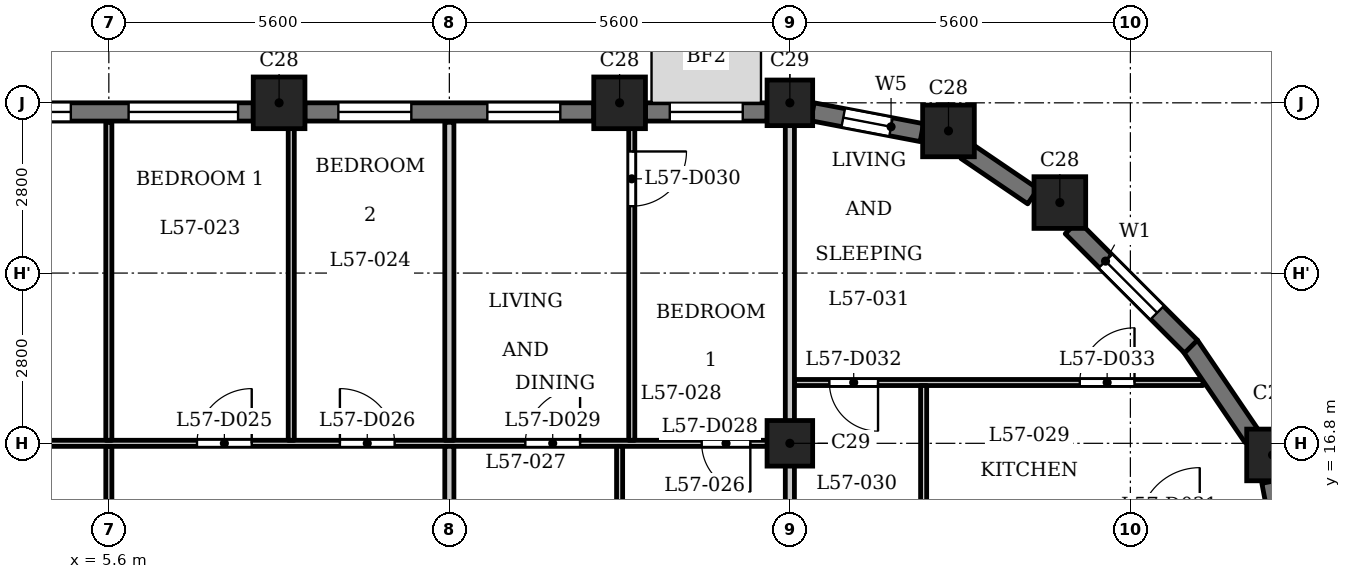
"""IFC4 building model, lengths in metres.
Left out: names, types, materials, properties, quantities, classifications, styles, units other than length and angle.
Written with IfcOpenShell. Run it as: python <this file> out.ifc"""

import sys

from ifc_helpers import new_model, si_unit, direction, frame, frame_2d, origin, origin_2d, place, context, subcontext, project, spatial, rectangle, extrude, element, fill, save


model = new_model("IFC4")
c1 = context("Model", 3, precision=1e-05, world=origin(), true_north=direction((0.0, 1.0)))
c2 = subcontext(c1, "Body", "Model", "MODEL_VIEW")
j1 = project(units=[si_unit("LENGTHUNIT", "METRE"), si_unit("PLANEANGLEUNIT", "RADIAN")], contexts=[c1])
p1 = place(None, origin())
s1 = spatial("IfcSite", under=j1, at=p1, CompositionType="ELEMENT")
p2 = place(p1, origin())
s2 = spatial("IfcBuilding", under=s1, at=p2, CompositionType="ELEMENT")
p3 = place(p2, frame((0.0, 0.0, 220.4)))
s3 = spatial("IfcBuildingStorey", under=s2, at=p3, CompositionType="ELEMENT", Elevation=220.4)
for number, where, z_axis, x_axis in (
    (1, (24.738, 16.609, 0.0), (0.0, 0.0, 1.0), (1.0, 0.0, 0.0)),
    (2, (21.24, 20.76, 0.0), (0.0, 0.0, 1.0), (1.0, 0.0, 0.0)),
    (3, (19.409, 21.938, 0.0), (0.0, 0.0, 1.0), (1.0, 0.0, 0.0)),
    (4, (14.0, 22.4, 0.0), (0.0, 0.0, 1.0), (1.0, 0.0, 0.0)),
    (5, (8.4, 22.4, 0.0), (0.0, 0.0, 1.0), (1.0, 0.0, 0.0)),
):
    element("IfcColumn", number, at=place(p3, frame(where, z_axis=z_axis, x_axis=x_axis)), inside=s3, PredefinedType="COLUMN", context=c2, shape_type="SweptSolid", body=[
        extrude(rectangle(XDim=0.85, YDim=0.85, at=origin_2d()), origin(), (0.0, 0.0, 1.0), 3.5),
    ])
for number, where, z_axis, x_axis in (
    (6, (16.8, 16.8, 0.0), (0.0, 0.0, 1.0), (1.0, 0.0, 0.0)),
    (7, (16.8, 22.4, 0.0), (0.0, 0.0, 1.0), (1.0, 0.0, 0.0)),
):
    element("IfcColumn", number, at=place(p3, frame(where, z_axis=z_axis, x_axis=x_axis)), inside=s3, PredefinedType="COLUMN", context=c2, shape_type="SweptSolid", body=[
        extrude(rectangle(XDim=0.75, YDim=0.75, at=origin_2d()), origin(), (0.0, 0.0, 1.0), 3.5),
    ])
for number, where, z_axis, x_axis in (
    (8, (25.053, 14.372, 0.0), (0.0, 0.0, 1.0), (-0.187, 0.982, 0.0)),
    (9, (24.408, 16.898, 0.0), (0.0, 0.0, 1.0), (-0.562, 0.827, 0.0)),
):
    element("IfcWall", number, at=place(p3, frame(where, z_axis=z_axis, x_axis=x_axis)), inside=s3, PredefinedType="SOLIDWALL", context=c2, shape_type="SweptSolid", body=[
        extrude(rectangle(XDim=1.831, YDim=0.3, at=frame_2d((0.916, 0.0))), origin(), (0.0, 0.0, 1.0), 2.5),
    ])
p4 = place(p3, frame((23.397, 18.391, 0.0), z_axis=(0.0, 0.0, 1.0), x_axis=(-0.707106781187, 0.707106781187, 0.0)))
e10 = element("IfcWall", 10, at=p4, inside=s3, PredefinedType="SOLIDWALL", context=c2, shape_type="SweptSolid", body=[
    extrude(rectangle(XDim=2.775, YDim=0.3, at=frame_2d((1.388, 0.0))), origin(), (0.0, 0.0, 1.0), 2.5),
])
p5 = place(p4, frame((0.788, 0.0, 0.6)))
e11 = element("IfcOpeningElement", 11, at=p5, cuts=e10, PredefinedType="OPENING", context=c2, shape_type="SweptSolid", body=[
    extrude(rectangle(XDim=1.2, YDim=1.55, at=frame_2d((0.6, 0.775))), frame((0.0, 0.16, 0.0), z_axis=(0.0, -1.0, 0.0), x_axis=(1.0, 0.0, 0.0)), (0.0, 0.0, 1.0), 0.32),
])
p6 = place(p3, frame((20.796, 20.862, 0.0), z_axis=(0.0, 0.0, 1.0), x_axis=(-0.827035970432, 0.562149004813, 0.0)))
e12 = element("IfcWall", 12, at=p6, inside=s3, PredefinedType="SOLIDWALL", context=c2, shape_type="SweptSolid", body=[
    extrude(rectangle(XDim=1.327, YDim=0.3, at=frame_2d((0.664, 0.0))), origin(), (0.0, 0.0, 1.0), 2.5),
])
p7 = place(p3, frame((18.971, 21.91, 0.0), z_axis=(0.0, 0.0, 1.0), x_axis=(-0.982300037503, 0.187314271538, 0.0)))
e13 = element("IfcWall", 13, at=p7, inside=s3, PredefinedType="SOLIDWALL", context=c2, shape_type="SweptSolid", body=[
    extrude(rectangle(XDim=1.831, YDim=0.3, at=frame_2d((0.916, 0.0))), origin(), (0.0, 0.0, 1.0), 2.5),
])
p8 = place(p7, frame((0.516, 0.0, 0.6)))
e14 = element("IfcOpeningElement", 14, at=p8, cuts=e13, PredefinedType="OPENING", context=c2, shape_type="SweptSolid", body=[
    extrude(rectangle(XDim=0.8, YDim=1.55, at=frame_2d((0.4, 0.775))), frame((0.0, 0.16, 0.0), z_axis=(0.0, -1.0, 0.0), x_axis=(1.0, 0.0, 0.0)), (0.0, 0.0, 1.0), 0.32),
])
p9 = place(p3, frame((16.425, 22.25, 0.0), z_axis=(0.0, 0.0, 1.0), x_axis=(-1.0, 0.0, 0.0)))
e15 = element("IfcWall", 15, at=p9, inside=s3, PredefinedType="SOLIDWALL", context=c2, shape_type="SweptSolid", body=[
    extrude(rectangle(XDim=2.0, YDim=0.3, at=frame_2d((1.0, 0.0))), origin(), (0.0, 0.0, 1.0), 2.5),
])
p10 = place(p9, frame((0.4, 0.0, 0.6)))
e16 = element("IfcOpeningElement", 16, at=p10, cuts=e15, PredefinedType="OPENING", context=c2, shape_type="SweptSolid", body=[
    extrude(rectangle(XDim=1.2, YDim=1.55, at=frame_2d((0.6, 0.775))), frame((0.0, 0.16, 0.0), z_axis=(0.0, -1.0, 0.0), x_axis=(1.0, 0.0, 0.0)), (0.0, 0.0, 1.0), 0.32),
])
p11 = place(p3, frame((13.575, 22.25, 0.0), z_axis=(0.0, 0.0, 1.0), x_axis=(-1.0, 0.0, 0.0)))
e17 = element("IfcWall", 17, at=p11, inside=s3, PredefinedType="SOLIDWALL", context=c2, shape_type="SweptSolid", body=[
    extrude(rectangle(XDim=4.75, YDim=0.3, at=frame_2d((2.375, 0.0))), origin(), (0.0, 0.0, 1.0), 2.5),
])
p12 = place(p11, frame((0.55, 0.0, 0.6)))
e18 = element("IfcOpeningElement", 18, at=p12, cuts=e17, PredefinedType="OPENING", context=c2, shape_type="SweptSolid", body=[
    extrude(rectangle(XDim=1.2, YDim=1.55, at=frame_2d((0.6, 0.775))), frame((0.0, 0.16, 0.0), z_axis=(0.0, -1.0, 0.0), x_axis=(1.0, 0.0, 0.0)), (0.0, 0.0, 1.0), 0.32),
])
p13 = place(p11, frame((3.0, 0.0, 0.6)))
e19 = element("IfcOpeningElement", 19, at=p13, cuts=e17, PredefinedType="OPENING", context=c2, shape_type="SweptSolid", body=[
    extrude(rectangle(XDim=1.2, YDim=1.55, at=frame_2d((0.6, 0.775))), frame((0.0, 0.16, 0.0), z_axis=(0.0, -1.0, 0.0), x_axis=(1.0, 0.0, 0.0)), (0.0, 0.0, 1.0), 0.32),
])
p14 = place(p3, frame((7.975, 22.25, 0.0), z_axis=(0.0, 0.0, 1.0), x_axis=(-1.0, 0.0, 0.0)))
e20 = element("IfcWall", 20, at=p14, inside=s3, PredefinedType="SOLIDWALL", context=c2, shape_type="SweptSolid", body=[
    extrude(rectangle(XDim=4.75, YDim=0.3, at=frame_2d((2.375, 0.0))), origin(), (0.0, 0.0, 1.0), 2.5),
])
p15 = place(p14, frame((0.25, 0.0, 0.9)))
e21 = element("IfcOpeningElement", 21, at=p15, cuts=e20, PredefinedType="OPENING", context=c2, shape_type="SweptSolid", body=[
    extrude(rectangle(XDim=1.8, YDim=1.25, at=frame_2d((0.9, 0.625))), frame((0.0, 0.16, 0.0), z_axis=(0.0, -1.0, 0.0), x_axis=(1.0, 0.0, 0.0)), (0.0, 0.0, 1.0), 0.32),
])
p16 = place(p14, frame((3.0, 0.0, 0.6)))
e22 = element("IfcOpeningElement", 22, at=p16, cuts=e20, PredefinedType="OPENING", context=c2, shape_type="SweptSolid", body=[
    extrude(rectangle(XDim=1.2, YDim=1.55, at=frame_2d((0.6, 0.775))), frame((0.0, 0.16, 0.0), z_axis=(0.0, -1.0, 0.0), x_axis=(1.0, 0.0, 0.0)), (0.0, 0.0, 1.0), 0.32),
])
p17 = place(p3, frame((-16.725, 16.8, 0.0), z_axis=(0.0, 0.0, 1.0), x_axis=(1.0, 0.0, 0.0)))
e23 = element("IfcWall", 23, at=p17, inside=s3, PredefinedType="PARTITIONING", context=c2, shape_type="SweptSolid", body=[
    extrude(rectangle(XDim=33.45, YDim=0.1, at=frame_2d((16.725, 0.0))), origin(), (0.0, 0.0, 1.0), 3.2),
])
p18 = place(p17, frame((11.675, 0.0, 0.0)))
e24 = element("IfcOpeningElement", 24, at=p18, cuts=e23, PredefinedType="OPENING", context=c2, shape_type="SweptSolid", body=[
    extrude(rectangle(XDim=0.9, YDim=2.1, at=frame_2d((0.45, 1.05))), frame((0.0, 0.06, 0.0), z_axis=(0.0, -1.0, 0.0), x_axis=(1.0, 0.0, 0.0)), (0.0, 0.0, 1.0), 0.12),
])
p19 = place(p17, frame((9.575, 0.0, 0.0)))
e25 = element("IfcOpeningElement", 25, at=p19, cuts=e23, PredefinedType="OPENING", context=c2, shape_type="SweptSolid", body=[
    extrude(rectangle(XDim=0.9, YDim=2.1, at=frame_2d((0.45, 1.05))), frame((0.0, 0.06, 0.0), z_axis=(0.0, -1.0, 0.0), x_axis=(1.0, 0.0, 0.0)), (0.0, 0.0, 1.0), 0.12),
])
p20 = place(p17, frame((17.375, 0.0, 0.0)))
e26 = element("IfcOpeningElement", 26, at=p20, cuts=e23, PredefinedType="OPENING", context=c2, shape_type="SweptSolid", body=[
    extrude(rectangle(XDim=0.8, YDim=2.1, at=frame_2d((0.4, 1.05))), frame((0.0, 0.06, 0.0), z_axis=(0.0, -1.0, 0.0), x_axis=(1.0, 0.0, 0.0)), (0.0, 0.0, 1.0), 0.12),
])
p21 = place(p17, frame((19.525, 0.0, 0.0)))
e27 = element("IfcOpeningElement", 27, at=p21, cuts=e23, PredefinedType="OPENING", context=c2, shape_type="SweptSolid", body=[
    extrude(rectangle(XDim=0.9, YDim=2.1, at=frame_2d((0.45, 1.05))), frame((0.0, 0.06, 0.0), z_axis=(0.0, -1.0, 0.0), x_axis=(1.0, 0.0, 0.0)), (0.0, 0.0, 1.0), 0.12),
])
p22 = place(p17, frame((23.775, 0.0, 0.0)))
e28 = element("IfcOpeningElement", 28, at=p22, cuts=e23, PredefinedType="OPENING", context=c2, shape_type="SweptSolid", body=[
    extrude(rectangle(XDim=0.9, YDim=2.1, at=frame_2d((0.45, 1.05))), frame((0.0, 0.06, 0.0), z_axis=(0.0, -1.0, 0.0), x_axis=(1.0, 0.0, 0.0)), (0.0, 0.0, 1.0), 0.12),
])
p23 = place(p17, frame((26.125, 0.0, 0.0)))
e29 = element("IfcOpeningElement", 29, at=p23, cuts=e23, PredefinedType="OPENING", context=c2, shape_type="SweptSolid", body=[
    extrude(rectangle(XDim=0.9, YDim=2.1, at=frame_2d((0.45, 1.05))), frame((0.0, 0.06, 0.0), z_axis=(0.0, -1.0, 0.0), x_axis=(1.0, 0.0, 0.0)), (0.0, 0.0, 1.0), 0.12),
])
p24 = place(p17, frame((32.075, 0.0, 0.0)))
e30 = element("IfcOpeningElement", 30, at=p24, cuts=e23, PredefinedType="OPENING", context=c2, shape_type="SweptSolid", body=[
    extrude(rectangle(XDim=0.8, YDim=2.1, at=frame_2d((0.4, 1.05))), frame((0.0, 0.06, 0.0), z_axis=(0.0, -1.0, 0.0), x_axis=(1.0, 0.0, 0.0)), (0.0, 0.0, 1.0), 0.12),
])
p25 = place(p17, frame((29.175, 0.0, 0.0)))
e31 = element("IfcOpeningElement", 31, at=p25, cuts=e23, PredefinedType="OPENING", context=c2, shape_type="SweptSolid", body=[
    extrude(rectangle(XDim=0.9, YDim=2.1, at=frame_2d((0.45, 1.05))), frame((0.0, 0.06, 0.0), z_axis=(0.0, -1.0, 0.0), x_axis=(1.0, 0.0, 0.0)), (0.0, 0.0, 1.0), 0.12),
])
p26 = place(p3, frame((16.875, 17.8, 0.0), z_axis=(0.0, 0.0, 1.0), x_axis=(1.0, 0.0, 0.0)))
e32 = element("IfcWall", 32, at=p26, inside=s3, PredefinedType="PARTITIONING", context=c2, shape_type="SweptSolid", body=[
    extrude(rectangle(XDim=6.719, YDim=0.1, at=frame_2d((3.359, 0.0))), origin(), (0.0, 0.0, 1.0), 3.2),
])
p27 = place(p26, frame((0.575, 0.0, 0.0)))
e33 = element("IfcOpeningElement", 33, at=p27, cuts=e32, PredefinedType="OPENING", context=c2, shape_type="SweptSolid", body=[
    extrude(rectangle(XDim=0.8, YDim=2.1, at=frame_2d((0.4, 1.05))), frame((0.0, 0.06, 0.0), z_axis=(0.0, -1.0, 0.0), x_axis=(1.0, 0.0, 0.0)), (0.0, 0.0, 1.0), 0.12),
])
p28 = place(p26, frame((4.693, 0.0, 0.0)))
e34 = element("IfcOpeningElement", 34, at=p28, cuts=e32, PredefinedType="OPENING", context=c2, shape_type="SweptSolid", body=[
    extrude(rectangle(XDim=0.9, YDim=2.1, at=frame_2d((0.45, 1.05))), frame((0.0, 0.06, 0.0), z_axis=(0.0, -1.0, 0.0), x_axis=(1.0, 0.0, 0.0)), (0.0, 0.0, 1.0), 0.12),
])
p29 = place(p3, frame((5.6, 13.275, 0.0), z_axis=(0.0, 0.0, 1.0), x_axis=(0.0, 1.0, 0.0)))
e35 = element("IfcWall", 35, at=p29, inside=s3, PredefinedType="PARTITIONING", context=c2, shape_type="SweptSolid", body=[
    extrude(rectangle(XDim=3.475, YDim=0.1, at=frame_2d((1.738, 0.0))), origin(), (0.0, 0.0, 1.0), 3.2),
])
p30 = place(p29, frame((0.475, 0.0, 0.0)))
e36 = element("IfcOpeningElement", 36, at=p30, cuts=e35, PredefinedType="OPENING", context=c2, shape_type="SweptSolid", body=[
    extrude(rectangle(XDim=0.9, YDim=2.1, at=frame_2d((0.45, 1.05))), frame((0.0, 0.06, 0.0), z_axis=(0.0, -1.0, 0.0), x_axis=(1.0, 0.0, 0.0)), (0.0, 0.0, 1.0), 0.12),
])
p31 = place(p3, frame((5.6, 16.85, 0.0), z_axis=(0.0, 0.0, 1.0), x_axis=(0.0, 1.0, 0.0)))
e37 = element("IfcWall", 37, at=p31, inside=s3, PredefinedType="PARTITIONING", context=c2, shape_type="SweptSolid", body=[
    extrude(rectangle(XDim=5.23, YDim=0.1, at=frame_2d((2.615, 0.0))), origin(), (0.0, 0.0, 1.0), 3.2),
])
p32 = place(p3, frame((8.6, 16.85, 0.0), z_axis=(0.0, 0.0, 1.0), x_axis=(0.0, 1.0, 0.0)))
e38 = element("IfcWall", 38, at=p32, inside=s3, PredefinedType="PARTITIONING", context=c2, shape_type="SweptSolid", body=[
    extrude(rectangle(XDim=5.955, YDim=0.1, at=frame_2d((2.978, 0.0))), origin(), (0.0, 0.0, 1.0), 3.2),
])
p33 = place(p3, frame((11.2, 13.275, 0.0), z_axis=(0.0, 0.0, 1.0), x_axis=(0.0, 1.0, 0.0)))
e39 = element("IfcWall", 39, at=p33, inside=s3, PredefinedType="PARTITIONING", context=c2, shape_type="SweptSolid", body=[
    extrude(rectangle(XDim=3.475, YDim=0.15, at=frame_2d((1.738, 0.0))), origin(), (0.0, 0.0, 1.0), 3.2),
])
p34 = place(p3, frame((11.2, 16.85, 0.0), z_axis=(0.0, 0.0, 1.0), x_axis=(0.0, 1.0, 0.0)))
e40 = element("IfcWall", 40, at=p34, inside=s3, PredefinedType="PARTITIONING", context=c2, shape_type="SweptSolid", body=[
    extrude(rectangle(XDim=5.23, YDim=0.15, at=frame_2d((2.615, 0.0))), origin(), (0.0, 0.0, 1.0), 3.2),
])
p35 = place(p3, frame((14.0, 13.275, 0.0), z_axis=(0.0, 0.0, 1.0), x_axis=(0.0, 1.0, 0.0)))
e41 = element("IfcWall", 41, at=p35, inside=s3, PredefinedType="PARTITIONING", context=c2, shape_type="SweptSolid", body=[
    extrude(rectangle(XDim=3.475, YDim=0.1, at=frame_2d((1.738, 0.0))), origin(), (0.0, 0.0, 1.0), 3.2),
])
p36 = place(p3, frame((14.2, 16.85, 0.0), z_axis=(0.0, 0.0, 1.0), x_axis=(0.0, 1.0, 0.0)))
e42 = element("IfcWall", 42, at=p36, inside=s3, PredefinedType="PARTITIONING", context=c2, shape_type="SweptSolid", body=[
    extrude(rectangle(XDim=5.46, YDim=0.1, at=frame_2d((2.73, 0.0))), origin(), (0.0, 0.0, 1.0), 3.2),
])
p37 = place(p36, frame((3.85, 0.0, 0.0)))
e43 = element("IfcOpeningElement", 43, at=p37, cuts=e42, PredefinedType="OPENING", context=c2, shape_type="SweptSolid", body=[
    extrude(rectangle(XDim=0.9, YDim=2.1, at=frame_2d((0.45, 1.05))), frame((0.0, 0.06, 0.0), z_axis=(0.0, -1.0, 0.0), x_axis=(1.0, 0.0, 0.0)), (0.0, 0.0, 1.0), 0.12),
])
p38 = place(p3, frame((16.8, 15.475, 0.0), z_axis=(0.0, 0.0, 1.0), x_axis=(0.0, 1.0, 0.0)))
e44 = element("IfcWall", 44, at=p38, inside=s3, PredefinedType="PARTITIONING", context=c2, shape_type="SweptSolid", body=[
    extrude(rectangle(XDim=6.835, YDim=0.15, at=frame_2d((3.417, 0.0))), origin(), (0.0, 0.0, 1.0), 2.55),
])
p39 = place(p3, frame((19.0, 15.475, 0.0), z_axis=(0.0, 0.0, 1.0), x_axis=(0.0, 1.0, 0.0)))
e45 = element("IfcWall", 45, at=p39, inside=s3, PredefinedType="PARTITIONING", context=c2, shape_type="SweptSolid", body=[
    extrude(rectangle(XDim=2.275, YDim=0.1, at=frame_2d((1.137, 0.0))), origin(), (0.0, 0.0, 1.0), 3.2),
])
p40 = place(p22, origin())
e46 = element("IfcDoor", 46, at=p40, inside=s3, OperationType="SINGLE_SWING_LEFT", PredefinedType="DOOR", context=c2, shape_type="SweptSolid", body=[
    extrude(rectangle(XDim=0.9, YDim=2.1, at=frame_2d((0.45, 1.05))), frame((0.0, 0.025, 0.0), z_axis=(0.0, -1.0, 0.0), x_axis=(1.0, 0.0, 0.0)), (0.0, 0.0, 1.0), 0.05),
])
fill(e28, e46)
p41 = place(p23, origin())
e47 = element("IfcDoor", 47, at=p41, inside=s3, OperationType="SINGLE_SWING_RIGHT", PredefinedType="DOOR", context=c2, shape_type="SweptSolid", body=[
    extrude(rectangle(XDim=0.9, YDim=2.1, at=frame_2d((0.45, 1.05))), frame((0.0, 0.025, 0.0), z_axis=(0.0, -1.0, 0.0), x_axis=(1.0, 0.0, 0.0)), (0.0, 0.0, 1.0), 0.05),
])
fill(e29, e47)
p42 = place(p24, origin())
e48 = element("IfcDoor", 48, at=p42, inside=s3, OperationType="SINGLE_SWING_RIGHT", PredefinedType="DOOR", context=c2, shape_type="SweptSolid", body=[
    extrude(rectangle(XDim=0.8, YDim=2.1, at=frame_2d((0.4, 1.05))), frame((0.0, 0.025, 0.0), z_axis=(0.0, -1.0, 0.0), x_axis=(1.0, 0.0, 0.0)), (0.0, 0.0, 1.0), 0.05),
])
fill(e30, e48)
p43 = place(p25, origin())
e49 = element("IfcDoor", 49, at=p43, inside=s3, OperationType="SINGLE_SWING_LEFT", PredefinedType="DOOR", context=c2, shape_type="SweptSolid", body=[
    extrude(rectangle(XDim=0.9, YDim=2.1, at=frame_2d((0.45, 1.05))), frame((0.0, 0.025, 0.0), z_axis=(0.0, -1.0, 0.0), x_axis=(1.0, 0.0, 0.0)), (0.0, 0.0, 1.0), 0.05),
])
fill(e31, e49)
p44 = place(p37, origin())
e50 = element("IfcDoor", 50, at=p44, inside=s3, OperationType="SINGLE_SWING_RIGHT", PredefinedType="DOOR", context=c2, shape_type="SweptSolid", body=[
    extrude(rectangle(XDim=0.9, YDim=2.1, at=frame_2d((0.45, 1.05))), frame((0.0, 0.025, 0.0), z_axis=(0.0, -1.0, 0.0), x_axis=(1.0, 0.0, 0.0)), (0.0, 0.0, 1.0), 0.05),
])
fill(e43, e50)
p45 = place(p27, origin())
e51 = element("IfcDoor", 51, at=p45, inside=s3, OperationType="SINGLE_SWING_RIGHT", PredefinedType="DOOR", context=c2, shape_type="SweptSolid", body=[
    extrude(rectangle(XDim=0.8, YDim=2.1, at=frame_2d((0.4, 1.05))), frame((0.0, 0.025, 0.0), z_axis=(0.0, -1.0, 0.0), x_axis=(1.0, 0.0, 0.0)), (0.0, 0.0, 1.0), 0.05),
])
fill(e33, e51)
p46 = place(p28, origin())
e52 = element("IfcDoor", 52, at=p46, inside=s3, OperationType="SINGLE_SWING_LEFT", PredefinedType="DOOR", context=c2, shape_type="SweptSolid", body=[
    extrude(rectangle(XDim=0.9, YDim=2.1, at=frame_2d((0.45, 1.05))), frame((0.0, 0.025, 0.0), z_axis=(0.0, -1.0, 0.0), x_axis=(1.0, 0.0, 0.0)), (0.0, 0.0, 1.0), 0.05),
])
fill(e34, e52)
p47 = place(p5, origin())
e53 = element("IfcWindow", 53, at=p47, inside=s3, PartitioningType="SINGLE_PANEL", PredefinedType="WINDOW", context=c2, shape_type="SweptSolid", body=[
    extrude(rectangle(XDim=1.2, YDim=1.55, at=frame_2d((0.6, 0.775))), frame((0.0, 0.03, 0.0), z_axis=(0.0, -1.0, 0.0), x_axis=(1.0, 0.0, 0.0)), (0.0, 0.0, 1.0), 0.06),
])
fill(e11, e53)
p48 = place(p8, origin())
e54 = element("IfcWindow", 54, at=p48, inside=s3, PartitioningType="SINGLE_PANEL", PredefinedType="WINDOW", context=c2, shape_type="SweptSolid", body=[
    extrude(rectangle(XDim=0.8, YDim=1.55, at=frame_2d((0.4, 0.775))), frame((0.0, 0.03, 0.0), z_axis=(0.0, -1.0, 0.0), x_axis=(1.0, 0.0, 0.0)), (0.0, 0.0, 1.0), 0.06),
])
fill(e14, e54)
p49 = place(p10, origin())
e55 = element("IfcWindow", 55, at=p49, inside=s3, PartitioningType="SINGLE_PANEL", PredefinedType="WINDOW", context=c2, shape_type="SweptSolid", body=[
    extrude(rectangle(XDim=1.2, YDim=1.55, at=frame_2d((0.6, 0.775))), frame((0.0, 0.03, 0.0), z_axis=(0.0, -1.0, 0.0), x_axis=(1.0, 0.0, 0.0)), (0.0, 0.0, 1.0), 0.06),
])
fill(e16, e55)
p50 = place(p12, origin())
e56 = element("IfcWindow", 56, at=p50, inside=s3, PartitioningType="SINGLE_PANEL", PredefinedType="WINDOW", context=c2, shape_type="SweptSolid", body=[
    extrude(rectangle(XDim=1.2, YDim=1.55, at=frame_2d((0.6, 0.775))), frame((0.0, 0.03, 0.0), z_axis=(0.0, -1.0, 0.0), x_axis=(1.0, 0.0, 0.0)), (0.0, 0.0, 1.0), 0.06),
])
fill(e18, e56)
p51 = place(p13, origin())
e57 = element("IfcWindow", 57, at=p51, inside=s3, PartitioningType="SINGLE_PANEL", PredefinedType="WINDOW", context=c2, shape_type="SweptSolid", body=[
    extrude(rectangle(XDim=1.2, YDim=1.55, at=frame_2d((0.6, 0.775))), frame((0.0, 0.03, 0.0), z_axis=(0.0, -1.0, 0.0), x_axis=(1.0, 0.0, 0.0)), (0.0, 0.0, 1.0), 0.06),
])
fill(e19, e57)
p52 = place(p15, origin())
e58 = element("IfcWindow", 58, at=p52, inside=s3, PartitioningType="SINGLE_PANEL", PredefinedType="WINDOW", context=c2, shape_type="SweptSolid", body=[
    extrude(rectangle(XDim=1.8, YDim=1.25, at=frame_2d((0.9, 0.625))), frame((0.0, 0.03, 0.0), z_axis=(0.0, -1.0, 0.0), x_axis=(1.0, 0.0, 0.0)), (0.0, 0.0, 1.0), 0.06),
])
fill(e21, e58)
p53 = place(p16, origin())
e59 = element("IfcWindow", 59, at=p53, inside=s3, PartitioningType="SINGLE_PANEL", PredefinedType="WINDOW", context=c2, shape_type="SweptSolid", body=[
    extrude(rectangle(XDim=1.2, YDim=1.55, at=frame_2d((0.6, 0.775))), frame((0.0, 0.03, 0.0), z_axis=(0.0, -1.0, 0.0), x_axis=(1.0, 0.0, 0.0)), (0.0, 0.0, 1.0), 0.06),
])
fill(e22, e59)
save(model, sys.argv[1])
